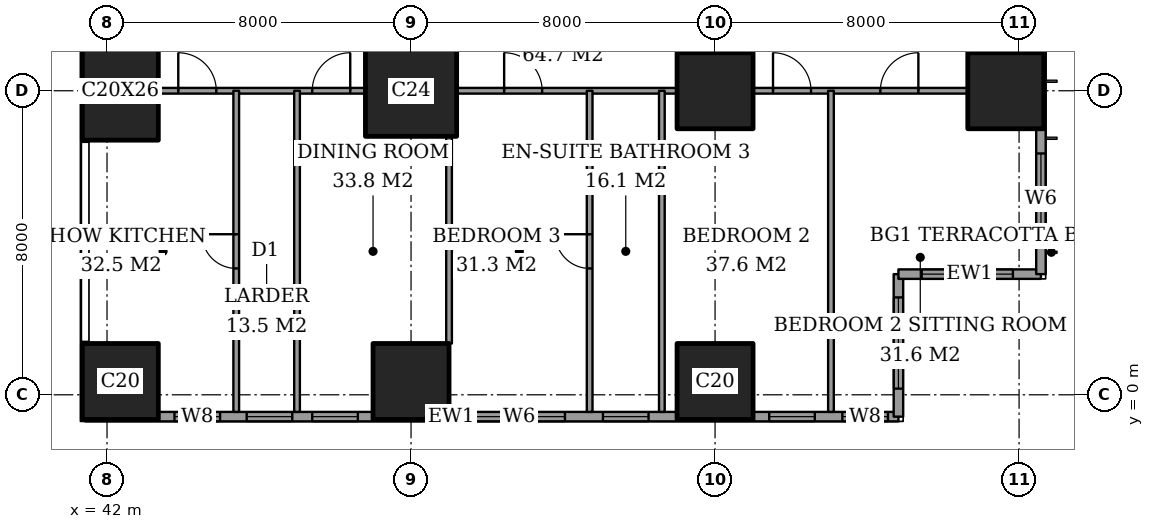
"""IFC4 building model, lengths in metres.
Left out: names, types, materials, properties, quantities, classifications, styles, units other than length and angle.
Written with IfcOpenShell. Run it as: python <this file> out.ifc"""

import sys

from ifc_helpers import new_model, si_unit, direction, frame, frame_2d, origin, origin_2d, place, context, subcontext, project, spatial, rectangle, extrude, element, fill, save


model = new_model("IFC4")
c1 = context("Model", 3, precision=1e-05, world=origin(), true_north=direction((0.0, 1.0)))
c2 = subcontext(c1, "Body", "Model", "MODEL_VIEW")
j1 = project(units=[si_unit("LENGTHUNIT", "METRE"), si_unit("PLANEANGLEUNIT", "RADIAN")], contexts=[c1])
p1 = place(None, origin())
s1 = spatial("IfcSite", under=j1, at=p1, CompositionType="ELEMENT")
p2 = place(p1, origin())
s2 = spatial("IfcBuilding", under=s1, at=p2, CompositionType="ELEMENT")
p3 = place(p2, frame((0.0, 0.0, 83.6)))
s3 = spatial("IfcBuildingStorey", under=s2, at=p3, CompositionType="ELEMENT", Elevation=83.6)
p4 = place(p3, frame((42.35, 0.35, 0.0), z_axis=(0.0, 0.0, 1.0), x_axis=(1.0, 0.0, 0.0)))
e1 = element("IfcColumn", 1, at=p4, inside=s3, PredefinedType="COLUMN", context=c2, shape_type="SweptSolid", body=[
    extrude(rectangle(XDim=2.0, YDim=2.0, at=origin_2d()), origin(), (0.0, 0.0, 1.0), 3.6),
])
p5 = place(p3, frame((42.35, 8.0, 0.0), z_axis=(0.0, 0.0, 1.0), x_axis=(1.0, 0.0, 0.0)))
e2 = element("IfcColumn", 2, at=p5, inside=s3, PredefinedType="COLUMN", context=c2, shape_type="SweptSolid", body=[
    extrude(rectangle(XDim=2.0, YDim=2.6, at=origin_2d()), origin(), (0.0, 0.0, 1.0), 3.6),
])
p6 = place(p3, frame((50.0, 0.35, 0.0), z_axis=(0.0, 0.0, 1.0), x_axis=(1.0, 0.0, 0.0)))
e3 = element("IfcColumn", 3, at=p6, inside=s3, PredefinedType="COLUMN", context=c2, shape_type="SweptSolid", body=[
    extrude(rectangle(XDim=2.0, YDim=2.0, at=origin_2d()), origin(), (0.0, 0.0, 1.0), 3.6),
])
p7 = place(p3, frame((50.0, 8.0, 0.0), z_axis=(0.0, 0.0, 1.0), x_axis=(1.0, 0.0, 0.0)))
e4 = element("IfcColumn", 4, at=p7, inside=s3, PredefinedType="COLUMN", context=c2, shape_type="SweptSolid", body=[
    extrude(rectangle(XDim=2.4, YDim=2.4, at=origin_2d()), origin(), (0.0, 0.0, 1.0), 3.6),
])
for number, where, z_axis, x_axis in (
    (5, (58.0, 0.35, 0.0), (0.0, 0.0, 1.0), (1.0, 0.0, 0.0)),
    (6, (58.0, 8.0, 0.0), (0.0, 0.0, 1.0), (1.0, 0.0, 0.0)),
    (7, (65.65, 8.0, 0.0), (0.0, 0.0, 1.0), (1.0, 0.0, 0.0)),
):
    element("IfcColumn", number, at=place(p3, frame(where, z_axis=z_axis, x_axis=x_axis)), inside=s3, PredefinedType="COLUMN", context=c2, shape_type="SweptSolid", body=[
        extrude(rectangle(XDim=2.0, YDim=2.0, at=origin_2d()), origin(), (0.0, 0.0, 1.0), 3.6),
    ])
p8 = place(p3, frame((41.425, -0.575, 0.0), z_axis=(0.0, 0.0, 1.0), x_axis=(1.0, 0.0, 0.0)))
e8 = element("IfcWall", 8, at=p8, inside=s3, PredefinedType="SOLIDWALL", context=c2, shape_type="SweptSolid", body=[
    extrude(rectangle(XDim=21.4, YDim=0.25, at=frame_2d((10.7, 0.0))), origin(), (0.0, 0.0, 1.0), 3.6),
])
p9 = place(p8, frame((2.35, 0.0, 0.6)))
e9 = element("IfcOpeningElement", 9, at=p9, cuts=e8, PredefinedType="OPENING", context=c2, shape_type="SweptSolid", body=[
    extrude(rectangle(XDim=1.2, YDim=2.0, at=frame_2d((0.6, 1.0))), frame((0.0, 0.135, 0.0), z_axis=(0.0, -1.0, 0.0), x_axis=(1.0, 0.0, 0.0)), (0.0, 0.0, 1.0), 0.27),
])
p10 = place(p8, frame((4.25, 0.0, 0.6)))
e10 = element("IfcOpeningElement", 10, at=p10, cuts=e8, PredefinedType="OPENING", context=c2, shape_type="SweptSolid", body=[
    extrude(rectangle(XDim=1.2, YDim=2.0, at=frame_2d((0.6, 1.0))), frame((0.0, 0.135, 0.0), z_axis=(0.0, -1.0, 0.0), x_axis=(1.0, 0.0, 0.0)), (0.0, 0.0, 1.0), 0.27),
])
p11 = place(p8, frame((5.975, 0.0, 0.6)))
e11 = element("IfcOpeningElement", 11, at=p11, cuts=e8, PredefinedType="OPENING", context=c2, shape_type="SweptSolid", body=[
    extrude(rectangle(XDim=1.2, YDim=2.0, at=frame_2d((0.6, 1.0))), frame((0.0, 0.135, 0.0), z_axis=(0.0, -1.0, 0.0), x_axis=(1.0, 0.0, 0.0)), (0.0, 0.0, 1.0), 0.27),
])
p12 = place(p8, frame((10.225, 0.0, 0.6)))
e12 = element("IfcOpeningElement", 12, at=p12, cuts=e8, PredefinedType="OPENING", context=c2, shape_type="SweptSolid", body=[
    extrude(rectangle(XDim=2.4, YDim=2.0, at=frame_2d((1.2, 1.0))), frame((0.0, 0.135, 0.0), z_axis=(0.0, -1.0, 0.0), x_axis=(1.0, 0.0, 0.0)), (0.0, 0.0, 1.0), 0.27),
])
p13 = place(p8, frame((13.625, 0.0, 0.6)))
e13 = element("IfcOpeningElement", 13, at=p13, cuts=e8, PredefinedType="OPENING", context=c2, shape_type="SweptSolid", body=[
    extrude(rectangle(XDim=1.2, YDim=2.0, at=frame_2d((0.6, 1.0))), frame((0.0, 0.135, 0.0), z_axis=(0.0, -1.0, 0.0), x_axis=(1.0, 0.0, 0.0)), (0.0, 0.0, 1.0), 0.27),
])
p14 = place(p8, frame((18.0, 0.0, 0.6)))
e14 = element("IfcOpeningElement", 14, at=p14, cuts=e8, PredefinedType="OPENING", context=c2, shape_type="SweptSolid", body=[
    extrude(rectangle(XDim=1.2, YDim=2.0, at=frame_2d((0.6, 1.0))), frame((0.0, 0.135, 0.0), z_axis=(0.0, -1.0, 0.0), x_axis=(1.0, 0.0, 0.0)), (0.0, 0.0, 1.0), 0.27),
])
p15 = place(p8, frame((19.925, 0.0, 0.6)))
e15 = element("IfcOpeningElement", 15, at=p15, cuts=e8, PredefinedType="OPENING", context=c2, shape_type="SweptSolid", body=[
    extrude(rectangle(XDim=1.2, YDim=2.0, at=frame_2d((0.6, 1.0))), frame((0.0, 0.135, 0.0), z_axis=(0.0, -1.0, 0.0), x_axis=(1.0, 0.0, 0.0)), (0.0, 0.0, 1.0), 0.27),
])
p16 = place(p3, frame((62.825, -0.575, 0.0), z_axis=(0.0, 0.0, 1.0), x_axis=(0.0, 1.0, 0.0)))
e16 = element("IfcWall", 16, at=p16, inside=s3, PredefinedType="SOLIDWALL", context=c2, shape_type="SweptSolid", body=[
    extrude(rectangle(XDim=3.75, YDim=0.25, at=frame_2d((1.875, 0.0))), origin(), (0.0, 0.0, 1.0), 3.6),
])
p17 = place(p16, frame((0.738, 0.0, 0.6)))
e17 = element("IfcOpeningElement", 17, at=p17, cuts=e16, PredefinedType="OPENING", context=c2, shape_type="SweptSolid", body=[
    extrude(rectangle(XDim=2.4, YDim=2.0, at=frame_2d((1.2, 1.0))), frame((0.0, 0.135, 0.0), z_axis=(0.0, -1.0, 0.0), x_axis=(1.0, 0.0, 0.0)), (0.0, 0.0, 1.0), 0.27),
])
p18 = place(p3, frame((62.825, 3.175, 0.0), z_axis=(0.0, 0.0, 1.0), x_axis=(1.0, 0.0, 0.0)))
e18 = element("IfcWall", 18, at=p18, inside=s3, PredefinedType="SOLIDWALL", context=c2, shape_type="SweptSolid", body=[
    extrude(rectangle(XDim=3.75, YDim=0.25, at=frame_2d((1.875, 0.0))), origin(), (0.0, 0.0, 1.0), 3.6),
])
p19 = place(p18, frame((0.613, 0.0, 0.6)))
e19 = element("IfcOpeningElement", 19, at=p19, cuts=e18, PredefinedType="OPENING", context=c2, shape_type="SweptSolid", body=[
    extrude(rectangle(XDim=2.4, YDim=2.0, at=frame_2d((1.2, 1.0))), frame((0.0, 0.135, 0.0), z_axis=(0.0, -1.0, 0.0), x_axis=(1.0, 0.0, 0.0)), (0.0, 0.0, 1.0), 0.27),
])
p20 = place(p3, frame((66.575, 3.175, 0.0), z_axis=(0.0, 0.0, 1.0), x_axis=(0.0, 1.0, 0.0)))
e20 = element("IfcWall", 20, at=p20, inside=s3, PredefinedType="SOLIDWALL", context=c2, shape_type="SweptSolid", body=[
    extrude(rectangle(XDim=41.65, YDim=0.25, at=frame_2d((20.825, 0.0))), origin(), (0.0, 0.0, 1.0), 3.6),
])
p21 = place(p20, frame((0.775, 0.0, 0.6)))
e21 = element("IfcOpeningElement", 21, at=p21, cuts=e20, PredefinedType="OPENING", context=c2, shape_type="SweptSolid", body=[
    extrude(rectangle(XDim=2.4, YDim=2.0, at=frame_2d((1.2, 1.0))), frame((0.0, 0.135, 0.0), z_axis=(0.0, -1.0, 0.0), x_axis=(1.0, 0.0, 0.0)), (0.0, 0.0, 1.0), 0.27),
])
p22 = place(p20, frame((6.1, 0.0, 0.6)))
e22 = element("IfcOpeningElement", 22, at=p22, cuts=e20, PredefinedType="OPENING", context=c2, shape_type="SweptSolid", body=[
    extrude(rectangle(XDim=1.2, YDim=2.0, at=frame_2d((0.6, 1.0))), frame((0.0, 0.135, 0.0), z_axis=(0.0, -1.0, 0.0), x_axis=(1.0, 0.0, 0.0)), (0.0, 0.0, 1.0), 0.27),
])
p23 = place(p20, frame((8.275, 0.0, 0.6)))
e23 = element("IfcOpeningElement", 23, at=p23, cuts=e20, PredefinedType="OPENING", context=c2, shape_type="SweptSolid", body=[
    extrude(rectangle(XDim=2.4, YDim=2.0, at=frame_2d((1.2, 1.0))), frame((0.0, 0.135, 0.0), z_axis=(0.0, -1.0, 0.0), x_axis=(1.0, 0.0, 0.0)), (0.0, 0.0, 1.0), 0.27),
])
p24 = place(p20, frame((15.775, 0.0, 0.6)))
e24 = element("IfcOpeningElement", 24, at=p24, cuts=e20, PredefinedType="OPENING", context=c2, shape_type="SweptSolid", body=[
    extrude(rectangle(XDim=2.4, YDim=2.0, at=frame_2d((1.2, 1.0))), frame((0.0, 0.135, 0.0), z_axis=(0.0, -1.0, 0.0), x_axis=(1.0, 0.0, 0.0)), (0.0, 0.0, 1.0), 0.27),
])
p25 = place(p20, frame((23.475, 0.0, 0.6)))
e25 = element("IfcOpeningElement", 25, at=p25, cuts=e20, PredefinedType="OPENING", context=c2, shape_type="SweptSolid", body=[
    extrude(rectangle(XDim=2.4, YDim=2.0, at=frame_2d((1.2, 1.0))), frame((0.0, 0.135, 0.0), z_axis=(0.0, -1.0, 0.0), x_axis=(1.0, 0.0, 0.0)), (0.0, 0.0, 1.0), 0.27),
])
p26 = place(p20, frame((30.975, 0.0, 0.6)))
e26 = element("IfcOpeningElement", 26, at=p26, cuts=e20, PredefinedType="OPENING", context=c2, shape_type="SweptSolid", body=[
    extrude(rectangle(XDim=2.4, YDim=2.0, at=frame_2d((1.2, 1.0))), frame((0.0, 0.135, 0.0), z_axis=(0.0, -1.0, 0.0), x_axis=(1.0, 0.0, 0.0)), (0.0, 0.0, 1.0), 0.27),
])
p27 = place(p20, frame((34.5, 0.0, 0.6)))
e27 = element("IfcOpeningElement", 27, at=p27, cuts=e20, PredefinedType="OPENING", context=c2, shape_type="SweptSolid", body=[
    extrude(rectangle(XDim=1.2, YDim=2.0, at=frame_2d((0.6, 1.0))), frame((0.0, 0.135, 0.0), z_axis=(0.0, -1.0, 0.0), x_axis=(1.0, 0.0, 0.0)), (0.0, 0.0, 1.0), 0.27),
])
p28 = place(p20, frame((38.475, 0.0, 0.6)))
e28 = element("IfcOpeningElement", 28, at=p28, cuts=e20, PredefinedType="OPENING", context=c2, shape_type="SweptSolid", body=[
    extrude(rectangle(XDim=2.4, YDim=2.0, at=frame_2d((1.2, 1.0))), frame((0.0, 0.135, 0.0), z_axis=(0.0, -1.0, 0.0), x_axis=(1.0, 0.0, 0.0)), (0.0, 0.0, 1.0), 0.27),
])
p29 = place(p3, frame((43.35, 8.0, 0.0), z_axis=(0.0, 0.0, 1.0), x_axis=(1.0, 0.0, 0.0)))
e29 = element("IfcWall", 29, at=p29, inside=s3, PredefinedType="PARTITIONING", context=c2, shape_type="SweptSolid", body=[
    extrude(rectangle(XDim=5.45, YDim=0.15, at=frame_2d((2.725, 0.0))), origin(), (0.0, 0.0, 1.0), 3.35),
])
p30 = place(p29, frame((4.05, 0.0, 0.0)))
e30 = element("IfcOpeningElement", 30, at=p30, cuts=e29, PredefinedType="OPENING", context=c2, shape_type="SweptSolid", body=[
    extrude(rectangle(XDim=1.0, YDim=2.1, at=frame_2d((0.5, 1.05))), frame((0.0, 0.085, 0.0), z_axis=(0.0, -1.0, 0.0), x_axis=(1.0, 0.0, 0.0)), (0.0, 0.0, 1.0), 0.17),
])
p31 = place(p29, frame((0.525, 0.0, 0.0)))
e31 = element("IfcOpeningElement", 31, at=p31, cuts=e29, PredefinedType="OPENING", context=c2, shape_type="SweptSolid", body=[
    extrude(rectangle(XDim=1.0, YDim=2.1, at=frame_2d((0.5, 1.05))), frame((0.0, 0.085, 0.0), z_axis=(0.0, -1.0, 0.0), x_axis=(1.0, 0.0, 0.0)), (0.0, 0.0, 1.0), 0.17),
])
p32 = place(p3, frame((51.2, 8.0, 0.0), z_axis=(0.0, 0.0, 1.0), x_axis=(1.0, 0.0, 0.0)))
e32 = element("IfcWall", 32, at=p32, inside=s3, PredefinedType="PARTITIONING", context=c2, shape_type="SweptSolid", body=[
    extrude(rectangle(XDim=5.8, YDim=0.15, at=frame_2d((2.9, 0.0))), origin(), (0.0, 0.0, 1.0), 3.35),
])
p33 = place(p32, frame((1.25, 0.0, 0.0)))
e33 = element("IfcOpeningElement", 33, at=p33, cuts=e32, PredefinedType="OPENING", context=c2, shape_type="SweptSolid", body=[
    extrude(rectangle(XDim=1.0, YDim=2.1, at=frame_2d((0.5, 1.05))), frame((0.0, 0.085, 0.0), z_axis=(0.0, -1.0, 0.0), x_axis=(1.0, 0.0, 0.0)), (0.0, 0.0, 1.0), 0.17),
])
p34 = place(p3, frame((59.0, 8.0, 0.0), z_axis=(0.0, 0.0, 1.0), x_axis=(1.0, 0.0, 0.0)))
e34 = element("IfcWall", 34, at=p34, inside=s3, PredefinedType="PARTITIONING", context=c2, shape_type="SweptSolid", body=[
    extrude(rectangle(XDim=5.65, YDim=0.15, at=frame_2d((2.825, 0.0))), origin(), (0.0, 0.0, 1.0), 3.35),
])
p35 = place(p34, frame((3.35, 0.0, 0.0)))
e35 = element("IfcOpeningElement", 35, at=p35, cuts=e34, PredefinedType="OPENING", context=c2, shape_type="SweptSolid", body=[
    extrude(rectangle(XDim=1.0, YDim=2.1, at=frame_2d((0.5, 1.05))), frame((0.0, 0.085, 0.0), z_axis=(0.0, -1.0, 0.0), x_axis=(1.0, 0.0, 0.0)), (0.0, 0.0, 1.0), 0.17),
])
p36 = place(p34, frame((0.525, 0.0, 0.0)))
e36 = element("IfcOpeningElement", 36, at=p36, cuts=e34, PredefinedType="OPENING", context=c2, shape_type="SweptSolid", body=[
    extrude(rectangle(XDim=1.0, YDim=2.1, at=frame_2d((0.5, 1.05))), frame((0.0, 0.085, 0.0), z_axis=(0.0, -1.0, 0.0), x_axis=(1.0, 0.0, 0.0)), (0.0, 0.0, 1.0), 0.17),
])
p37 = place(p3, frame((45.4, -0.45, 0.0), z_axis=(0.0, 0.0, 1.0), x_axis=(0.0, 1.0, 0.0)))
e37 = element("IfcWall", 37, at=p37, inside=s3, PredefinedType="PARTITIONING", context=c2, shape_type="SweptSolid", body=[
    extrude(rectangle(XDim=8.45, YDim=0.15, at=frame_2d((4.225, 0.0))), origin(), (0.0, 0.0, 1.0), 3.35),
])
p38 = place(p37, frame((3.775, 0.0, 0.0)))
e38 = element("IfcOpeningElement", 38, at=p38, cuts=e37, PredefinedType="OPENING", context=c2, shape_type="SweptSolid", body=[
    extrude(rectangle(XDim=0.9, YDim=2.1, at=frame_2d((0.45, 1.05))), frame((0.0, 0.085, 0.0), z_axis=(0.0, -1.0, 0.0), x_axis=(1.0, 0.0, 0.0)), (0.0, 0.0, 1.0), 0.17),
])
p39 = place(p3, frame((47.0, -0.45, 0.0), z_axis=(0.0, 0.0, 1.0), x_axis=(0.0, 1.0, 0.0)))
e39 = element("IfcWall", 39, at=p39, inside=s3, PredefinedType="PARTITIONING", context=c2, shape_type="SweptSolid", body=[
    extrude(rectangle(XDim=8.45, YDim=0.15, at=frame_2d((4.225, 0.0))), origin(), (0.0, 0.0, 1.0), 3.35),
])
p40 = place(p3, frame((51.0, 1.35, 0.0), z_axis=(0.0, 0.0, 1.0), x_axis=(0.0, 1.0, 0.0)))
e40 = element("IfcWall", 40, at=p40, inside=s3, PredefinedType="PARTITIONING", context=c2, shape_type="SweptSolid", body=[
    extrude(rectangle(XDim=5.45, YDim=0.15, at=frame_2d((2.725, 0.0))), origin(), (0.0, 0.0, 1.0), 3.35),
])
p41 = place(p3, frame((54.7, -0.45, 0.0), z_axis=(0.0, 0.0, 1.0), x_axis=(0.0, 1.0, 0.0)))
e41 = element("IfcWall", 41, at=p41, inside=s3, PredefinedType="PARTITIONING", context=c2, shape_type="SweptSolid", body=[
    extrude(rectangle(XDim=8.45, YDim=0.15, at=frame_2d((4.225, 0.0))), origin(), (0.0, 0.0, 1.0), 3.35),
])
p42 = place(p41, frame((3.775, 0.0, 0.0)))
e42 = element("IfcOpeningElement", 42, at=p42, cuts=e41, PredefinedType="OPENING", context=c2, shape_type="SweptSolid", body=[
    extrude(rectangle(XDim=0.9, YDim=2.1, at=frame_2d((0.45, 1.05))), frame((0.0, 0.085, 0.0), z_axis=(0.0, -1.0, 0.0), x_axis=(1.0, 0.0, 0.0)), (0.0, 0.0, 1.0), 0.17),
])
for number, where, z_axis, x_axis in (
    (43, (56.6, -0.45, 0.0), (0.0, 0.0, 1.0), (0.0, 1.0, 0.0)),
    (44, (61.05, -0.45, 0.0), (0.0, 0.0, 1.0), (0.0, 1.0, 0.0)),
):
    element("IfcWall", number, at=place(p3, frame(where, z_axis=z_axis, x_axis=x_axis)), inside=s3, PredefinedType="PARTITIONING", context=c2, shape_type="SweptSolid", body=[
        extrude(rectangle(XDim=8.45, YDim=0.15, at=frame_2d((4.225, 0.0))), origin(), (0.0, 0.0, 1.0), 3.35),
    ])
p43 = place(p9, origin())
e45 = element("IfcWindow", 45, at=p43, inside=s3, PartitioningType="SINGLE_PANEL", PredefinedType="WINDOW", context=c2, shape_type="SweptSolid", body=[
    extrude(rectangle(XDim=1.2, YDim=2.0, at=frame_2d((0.6, 1.0))), frame((0.0, 0.03, 0.0), z_axis=(0.0, -1.0, 0.0), x_axis=(1.0, 0.0, 0.0)), (0.0, 0.0, 1.0), 0.06),
])
fill(e9, e45)
p44 = place(p10, origin())
e46 = element("IfcWindow", 46, at=p44, inside=s3, PartitioningType="SINGLE_PANEL", PredefinedType="WINDOW", context=c2, shape_type="SweptSolid", body=[
    extrude(rectangle(XDim=1.2, YDim=2.0, at=frame_2d((0.6, 1.0))), frame((0.0, 0.03, 0.0), z_axis=(0.0, -1.0, 0.0), x_axis=(1.0, 0.0, 0.0)), (0.0, 0.0, 1.0), 0.06),
])
fill(e10, e46)
p45 = place(p11, origin())
e47 = element("IfcWindow", 47, at=p45, inside=s3, PartitioningType="SINGLE_PANEL", PredefinedType="WINDOW", context=c2, shape_type="SweptSolid", body=[
    extrude(rectangle(XDim=1.2, YDim=2.0, at=frame_2d((0.6, 1.0))), frame((0.0, 0.03, 0.0), z_axis=(0.0, -1.0, 0.0), x_axis=(1.0, 0.0, 0.0)), (0.0, 0.0, 1.0), 0.06),
])
fill(e11, e47)
p46 = place(p12, origin())
e48 = element("IfcWindow", 48, at=p46, inside=s3, PartitioningType="SINGLE_PANEL", PredefinedType="WINDOW", context=c2, shape_type="SweptSolid", body=[
    extrude(rectangle(XDim=2.4, YDim=2.0, at=frame_2d((1.2, 1.0))), frame((0.0, 0.03, 0.0), z_axis=(0.0, -1.0, 0.0), x_axis=(1.0, 0.0, 0.0)), (0.0, 0.0, 1.0), 0.06),
])
fill(e12, e48)
p47 = place(p13, origin())
e49 = element("IfcWindow", 49, at=p47, inside=s3, PartitioningType="SINGLE_PANEL", PredefinedType="WINDOW", context=c2, shape_type="SweptSolid", body=[
    extrude(rectangle(XDim=1.2, YDim=2.0, at=frame_2d((0.6, 1.0))), frame((0.0, 0.03, 0.0), z_axis=(0.0, -1.0, 0.0), x_axis=(1.0, 0.0, 0.0)), (0.0, 0.0, 1.0), 0.06),
])
fill(e13, e49)
p48 = place(p14, origin())
e50 = element("IfcWindow", 50, at=p48, inside=s3, PartitioningType="SINGLE_PANEL", PredefinedType="WINDOW", context=c2, shape_type="SweptSolid", body=[
    extrude(rectangle(XDim=1.2, YDim=2.0, at=frame_2d((0.6, 1.0))), frame((0.0, 0.03, 0.0), z_axis=(0.0, -1.0, 0.0), x_axis=(1.0, 0.0, 0.0)), (0.0, 0.0, 1.0), 0.06),
])
fill(e14, e50)
p49 = place(p15, origin())
e51 = element("IfcWindow", 51, at=p49, inside=s3, PartitioningType="SINGLE_PANEL", PredefinedType="WINDOW", context=c2, shape_type="SweptSolid", body=[
    extrude(rectangle(XDim=1.2, YDim=2.0, at=frame_2d((0.6, 1.0))), frame((0.0, 0.03, 0.0), z_axis=(0.0, -1.0, 0.0), x_axis=(1.0, 0.0, 0.0)), (0.0, 0.0, 1.0), 0.06),
])
fill(e15, e51)
p50 = place(p17, origin())
e52 = element("IfcWindow", 52, at=p50, inside=s3, PartitioningType="SINGLE_PANEL", PredefinedType="WINDOW", context=c2, shape_type="SweptSolid", body=[
    extrude(rectangle(XDim=2.4, YDim=2.0, at=frame_2d((1.2, 1.0))), frame((0.0, 0.03, 0.0), z_axis=(0.0, -1.0, 0.0), x_axis=(1.0, 0.0, 0.0)), (0.0, 0.0, 1.0), 0.06),
])
fill(e17, e52)
p51 = place(p19, origin())
e53 = element("IfcWindow", 53, at=p51, inside=s3, PartitioningType="SINGLE_PANEL", PredefinedType="WINDOW", context=c2, shape_type="SweptSolid", body=[
    extrude(rectangle(XDim=2.4, YDim=2.0, at=frame_2d((1.2, 1.0))), frame((0.0, 0.03, 0.0), z_axis=(0.0, -1.0, 0.0), x_axis=(1.0, 0.0, 0.0)), (0.0, 0.0, 1.0), 0.06),
])
fill(e19, e53)
p52 = place(p21, origin())
e54 = element("IfcWindow", 54, at=p52, inside=s3, PartitioningType="SINGLE_PANEL", PredefinedType="WINDOW", context=c2, shape_type="SweptSolid", body=[
    extrude(rectangle(XDim=2.4, YDim=2.0, at=frame_2d((1.2, 1.0))), frame((0.0, 0.03, 0.0), z_axis=(0.0, -1.0, 0.0), x_axis=(1.0, 0.0, 0.0)), (0.0, 0.0, 1.0), 0.06),
])
fill(e21, e54)
p53 = place(p35, origin())
e55 = element("IfcDoor", 55, at=p53, inside=s3, OperationType="SINGLE_SWING_LEFT", PredefinedType="DOOR", context=c2, shape_type="SweptSolid", body=[
    extrude(rectangle(XDim=1.0, YDim=2.1, at=frame_2d((0.5, 1.05))), frame((0.0, 0.025, 0.0), z_axis=(0.0, -1.0, 0.0), x_axis=(1.0, 0.0, 0.0)), (0.0, 0.0, 1.0), 0.05),
])
fill(e35, e55)
p54 = place(p36, origin())
e56 = element("IfcDoor", 56, at=p54, inside=s3, OperationType="SINGLE_SWING_RIGHT", PredefinedType="DOOR", context=c2, shape_type="SweptSolid", body=[
    extrude(rectangle(XDim=1.0, YDim=2.1, at=frame_2d((0.5, 1.05))), frame((0.0, 0.025, 0.0), z_axis=(0.0, -1.0, 0.0), x_axis=(1.0, 0.0, 0.0)), (0.0, 0.0, 1.0), 0.05),
])
fill(e36, e56)
p55 = place(p42, origin())
e57 = element("IfcDoor", 57, at=p55, inside=s3, OperationType="SINGLE_SWING_LEFT", PredefinedType="DOOR", context=c2, shape_type="SweptSolid", body=[
    extrude(rectangle(XDim=0.9, YDim=2.1, at=frame_2d((0.45, 1.05))), frame((0.0, 0.025, 0.0), z_axis=(0.0, -1.0, 0.0), x_axis=(1.0, 0.0, 0.0)), (0.0, 0.0, 1.0), 0.05),
])
fill(e42, e57)
p56 = place(p33, origin())
e58 = element("IfcDoor", 58, at=p56, inside=s3, OperationType="SINGLE_SWING_RIGHT", PredefinedType="DOOR", context=c2, shape_type="SweptSolid", body=[
    extrude(rectangle(XDim=1.0, YDim=2.1, at=frame_2d((0.5, 1.05))), frame((0.0, 0.025, 0.0), z_axis=(0.0, -1.0, 0.0), x_axis=(1.0, 0.0, 0.0)), (0.0, 0.0, 1.0), 0.05),
])
fill(e33, e58)
p57 = place(p30, origin())
e59 = element("IfcDoor", 59, at=p57, inside=s3, OperationType="SINGLE_SWING_LEFT", PredefinedType="DOOR", context=c2, shape_type="SweptSolid", body=[
    extrude(rectangle(XDim=1.0, YDim=2.1, at=frame_2d((0.5, 1.05))), frame((0.0, 0.025, 0.0), z_axis=(0.0, -1.0, 0.0), x_axis=(1.0, 0.0, 0.0)), (0.0, 0.0, 1.0), 0.05),
])
fill(e30, e59)
p58 = place(p38, origin())
e60 = element("IfcDoor", 60, at=p58, inside=s3, OperationType="SINGLE_SWING_LEFT", PredefinedType="DOOR", context=c2, shape_type="SweptSolid", body=[
    extrude(rectangle(XDim=0.9, YDim=2.1, at=frame_2d((0.45, 1.05))), frame((0.0, 0.025, 0.0), z_axis=(0.0, -1.0, 0.0), x_axis=(1.0, 0.0, 0.0)), (0.0, 0.0, 1.0), 0.05),
])
fill(e38, e60)
p59 = place(p31, origin())
e61 = element("IfcDoor", 61, at=p59, inside=s3, OperationType="SINGLE_SWING_RIGHT", PredefinedType="DOOR", context=c2, shape_type="SweptSolid", body=[
    extrude(rectangle(XDim=1.0, YDim=2.1, at=frame_2d((0.5, 1.05))), frame((0.0, 0.025, 0.0), z_axis=(0.0, -1.0, 0.0), x_axis=(1.0, 0.0, 0.0)), (0.0, 0.0, 1.0), 0.05),
])
fill(e31, e61)
save(model, sys.argv[1])
